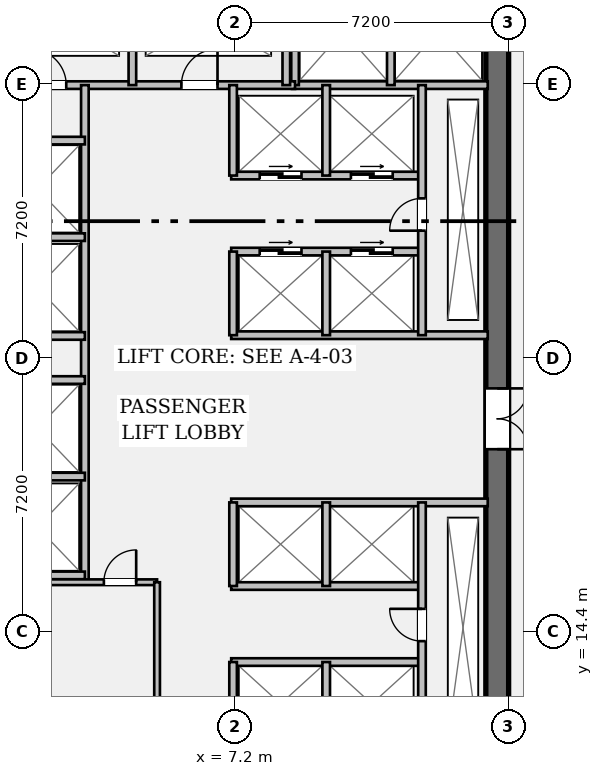
"""IFC4 building model, lengths in metres.
Left out: names, types, materials, properties, quantities, classifications, styles, units other than length and angle.
Written with IfcOpenShell. Run it as: python <this file> out.ifc"""

import sys

from ifc_helpers import new_model, si_unit, direction, frame, frame_2d, origin, place, context, subcontext, project, spatial, rectangle, extrude, element, fill, save


model = new_model("IFC4")
c1 = context("Model", 3, precision=1e-05, world=origin(), true_north=direction((0.0, 1.0)))
c2 = subcontext(c1, "Body", "Model", "MODEL_VIEW")
j1 = project(units=[si_unit("LENGTHUNIT", "METRE"), si_unit("PLANEANGLEUNIT", "RADIAN")], contexts=[c1])
p1 = place(None, origin())
s1 = spatial("IfcSite", under=j1, at=p1, CompositionType="ELEMENT")
p2 = place(p1, origin())
s2 = spatial("IfcBuilding", under=s1, at=p2, CompositionType="ELEMENT")
p3 = place(p2, frame((0.0, 0.0, 26.25)))
s3 = spatial("IfcBuildingStorey", under=s2, at=p3, CompositionType="ELEMENT", Elevation=26.25)
p4 = place(p3, frame((14.1, 35.4, 0.0), z_axis=(0.0, 0.0, 1.0), x_axis=(0.0, -1.0, 0.0)))
e1 = element("IfcWall", 1, at=p4, inside=s3, PredefinedType="SHEAR", context=c2, shape_type="SweptSolid", body=[
    extrude(rectangle(XDim=27.6, YDim=0.6, at=frame_2d((13.8, 0.0))), origin(), (0.0, 0.0, 1.0), 4.62),
])
p5 = place(p4, frame((1.3, 0.0, 0.0)))
e2 = element("IfcOpeningElement", 2, at=p5, cuts=e1, PredefinedType="OPENING", context=c2, shape_type="SweptSolid", body=[
    extrude(rectangle(XDim=1.2, YDim=2.15, at=frame_2d((0.6, 1.075))), frame((0.0, 0.312, 0.0), z_axis=(0.0, -1.0, 0.0), x_axis=(1.0, 0.0, 0.0)), (0.0, 0.0, 1.0), 0.624),
])
p6 = place(p4, frame((25.25, 0.0, 0.0)))
e3 = element("IfcOpeningElement", 3, at=p6, cuts=e1, PredefinedType="OPENING", context=c2, shape_type="SweptSolid", body=[
    extrude(rectangle(XDim=1.2, YDim=2.15, at=frame_2d((0.6, 1.075))), frame((0.0, 0.312, 0.0), z_axis=(0.0, -1.0, 0.0), x_axis=(1.0, 0.0, 0.0)), (0.0, 0.0, 1.0), 0.624),
])
p7 = place(p4, frame((14.6, 0.0, 0.0)))
e4 = element("IfcOpeningElement", 4, at=p7, cuts=e1, PredefinedType="OPENING", context=c2, shape_type="SweptSolid", body=[
    extrude(rectangle(XDim=1.6, YDim=2.2, at=frame_2d((0.8, 1.1))), frame((0.0, 0.312, 0.0), z_axis=(0.0, -1.0, 0.0), x_axis=(1.0, 0.0, 0.0)), (0.0, 0.0, 1.0), 0.624),
])
p8 = place(p3, frame((8.7, 28.78, 0.0), z_axis=(0.0, 0.0, 1.0), x_axis=(1.0, 0.0, 0.0)))
e5 = element("IfcWall", 5, at=p8, inside=s3, PredefinedType="PARTITIONING", context=c2, shape_type="SweptSolid", body=[
    extrude(rectangle(XDim=5.15, YDim=0.2, at=frame_2d((2.575, 0.0))), origin(), (0.0, 0.0, 1.0), 4.62),
])
for number, where, z_axis, x_axis in (
    (6, (8.78, 28.78, 0.0), (0.0, 0.0, 1.0), (0.0, 1.0, 0.0)),
    (7, (11.3, 28.78, 0.0), (0.0, 0.0, 1.0), (0.0, 1.0, 0.0)),
):
    element("IfcWall", number, at=place(p3, frame(where, z_axis=z_axis, x_axis=x_axis)), inside=s3, PredefinedType="PARTITIONING", context=c2, shape_type="SweptSolid", body=[
        extrude(rectangle(XDim=3.1, YDim=0.2, at=frame_2d((1.55, 0.0))), origin(), (0.0, 0.0, 1.0), 4.62),
    ])
p9 = place(p3, frame((0.6, 28.78, 0.0), z_axis=(0.0, 0.0, 1.0), x_axis=(1.0, 0.0, 0.0)))
e8 = element("IfcWall", 8, at=p9, inside=s3, PredefinedType="PARTITIONING", context=c2, shape_type="SweptSolid", body=[
    extrude(rectangle(XDim=8.18, YDim=0.2, at=frame_2d((4.09, 0.0))), origin(), (0.0, 0.0, 1.0), 4.62),
])
p10 = place(p9, frame((1.21, 0.0, 0.0)))
e9 = element("IfcOpeningElement", 9, at=p10, cuts=e8, PredefinedType="OPENING", context=c2, shape_type="SweptSolid", body=[
    extrude(rectangle(XDim=0.95, YDim=2.15, at=frame_2d((0.475, 1.075))), frame((0.0, 0.112, 0.0), z_axis=(0.0, -1.0, 0.0), x_axis=(1.0, 0.0, 0.0)), (0.0, 0.0, 1.0), 0.224),
])
p11 = place(p9, frame((5.19, 0.0, 0.0)))
e10 = element("IfcOpeningElement", 10, at=p11, cuts=e8, PredefinedType="OPENING", context=c2, shape_type="SweptSolid", body=[
    extrude(rectangle(XDim=0.95, YDim=2.15, at=frame_2d((0.475, 1.075))), frame((0.0, 0.112, 0.0), z_axis=(0.0, -1.0, 0.0), x_axis=(1.0, 0.0, 0.0)), (0.0, 0.0, 1.0), 0.224),
])
for number, where, z_axis, x_axis in (
    (11, (4.5, 28.78, 0.0), (0.0, 0.0, 1.0), (0.0, 1.0, 0.0)),
    (12, (8.55, 28.78, 0.0), (0.0, 0.0, 1.0), (0.0, 1.0, 0.0)),
):
    element("IfcWall", number, at=place(p3, frame(where, z_axis=z_axis, x_axis=x_axis)), inside=s3, PredefinedType="PARTITIONING", context=c2, shape_type="SweptSolid", body=[
        extrude(rectangle(XDim=2.94, YDim=0.2, at=frame_2d((1.47, 0.0))), origin(), (0.0, 0.0, 1.0), 4.62),
    ])
p12 = place(p3, frame((3.25, 15.7, 0.0), z_axis=(0.0, 0.0, 1.0), x_axis=(0.0, 1.0, 0.0)))
e13 = element("IfcWall", 13, at=p12, inside=s3, PredefinedType="PARTITIONING", context=c2, shape_type="SweptSolid", body=[
    extrude(rectangle(XDim=13.08, YDim=0.2, at=frame_2d((6.54, 0.0))), origin(), (0.0, 0.0, 1.0), 4.62),
])
for number, where, z_axis, x_axis in (
    (14, (0.6, 15.88, 0.0), (0.0, 0.0, 1.0), (1.0, 0.0, 0.0)),
    (15, (0.6, 18.48, 0.0), (0.0, 0.0, 1.0), (1.0, 0.0, 0.0)),
    (16, (0.6, 22.18, 0.0), (0.0, 0.0, 1.0), (1.0, 0.0, 0.0)),
    (17, (0.6, 24.78, 0.0), (0.0, 0.0, 1.0), (1.0, 0.0, 0.0)),
    (18, (0.6, 21.02, 0.0), (0.0, 0.0, 1.0), (1.0, 0.0, 0.0)),
    (19, (0.6, 27.32, 0.0), (0.0, 0.0, 1.0), (1.0, 0.0, 0.0)),
):
    element("IfcWall", number, at=place(p3, frame(where, z_axis=z_axis, x_axis=x_axis)), inside=s3, PredefinedType="PARTITIONING", context=c2, shape_type="SweptSolid", body=[
        extrude(rectangle(XDim=2.65, YDim=0.2, at=frame_2d((1.325, 0.0))), origin(), (0.0, 0.0, 1.0), 4.62),
    ])
p13 = place(p3, frame((7.1, 22.2, 0.0), z_axis=(0.0, 0.0, 1.0), x_axis=(1.0, 0.0, 0.0)))
e20 = element("IfcWall", 20, at=p13, inside=s3, PredefinedType="PARTITIONING", context=c2, shape_type="SweptSolid", body=[
    extrude(rectangle(XDim=6.75, YDim=0.2, at=frame_2d((3.375, 0.0))), origin(), (0.0, 0.0, 1.0), 4.62),
])
p14 = place(p3, frame((7.1, 24.4, 0.0), z_axis=(0.0, 0.0, 1.0), x_axis=(1.0, 0.0, 0.0)))
e21 = element("IfcWall", 21, at=p14, inside=s3, PredefinedType="PARTITIONING", context=c2, shape_type="SweptSolid", body=[
    extrude(rectangle(XDim=5.02, YDim=0.2, at=frame_2d((2.51, 0.0))), origin(), (0.0, 0.0, 1.0), 4.62),
])
p15 = place(p14, frame((0.75, 0.0, 0.0)))
e22 = element("IfcOpeningElement", 22, at=p15, cuts=e21, PredefinedType="OPENING", context=c2, shape_type="SweptSolid", body=[
    extrude(rectangle(XDim=1.1, YDim=2.2, at=frame_2d((0.55, 1.1))), frame((0.0, 0.112, 0.0), z_axis=(0.0, -1.0, 0.0), x_axis=(1.0, 0.0, 0.0)), (0.0, 0.0, 1.0), 0.224),
])
p16 = place(p14, frame((3.15, 0.0, 0.0)))
e23 = element("IfcOpeningElement", 23, at=p16, cuts=e21, PredefinedType="OPENING", context=c2, shape_type="SweptSolid", body=[
    extrude(rectangle(XDim=1.1, YDim=2.2, at=frame_2d((0.55, 1.1))), frame((0.0, 0.112, 0.0), z_axis=(0.0, -1.0, 0.0), x_axis=(1.0, 0.0, 0.0)), (0.0, 0.0, 1.0), 0.224),
])
p17 = place(p3, frame((7.1, 26.4, 0.0), z_axis=(0.0, 0.0, 1.0), x_axis=(1.0, 0.0, 0.0)))
e24 = element("IfcWall", 24, at=p17, inside=s3, PredefinedType="PARTITIONING", context=c2, shape_type="SweptSolid", body=[
    extrude(rectangle(XDim=5.02, YDim=0.2, at=frame_2d((2.51, 0.0))), origin(), (0.0, 0.0, 1.0), 4.62),
])
p18 = place(p17, frame((0.75, 0.0, 0.0)))
e25 = element("IfcOpeningElement", 25, at=p18, cuts=e24, PredefinedType="OPENING", context=c2, shape_type="SweptSolid", body=[
    extrude(rectangle(XDim=1.1, YDim=2.2, at=frame_2d((0.55, 1.1))), frame((0.0, 0.112, 0.0), z_axis=(0.0, -1.0, 0.0), x_axis=(1.0, 0.0, 0.0)), (0.0, 0.0, 1.0), 0.224),
])
p19 = place(p17, frame((3.15, 0.0, 0.0)))
e26 = element("IfcOpeningElement", 26, at=p19, cuts=e24, PredefinedType="OPENING", context=c2, shape_type="SweptSolid", body=[
    extrude(rectangle(XDim=1.1, YDim=2.2, at=frame_2d((0.55, 1.1))), frame((0.0, 0.112, 0.0), z_axis=(0.0, -1.0, 0.0), x_axis=(1.0, 0.0, 0.0)), (0.0, 0.0, 1.0), 0.224),
])
p20 = place(p3, frame((7.15, 22.2, 0.0), z_axis=(0.0, 0.0, 1.0), x_axis=(0.0, 1.0, 0.0)))
e27 = element("IfcWall", 27, at=p20, inside=s3, PredefinedType="PARTITIONING", context=c2, shape_type="SweptSolid", body=[
    extrude(rectangle(XDim=2.2, YDim=0.2, at=frame_2d((1.1, 0.0))), origin(), (0.0, 0.0, 1.0), 4.62),
])
p21 = place(p3, frame((7.15, 26.4, 0.0), z_axis=(0.0, 0.0, 1.0), x_axis=(0.0, 1.0, 0.0)))
e28 = element("IfcWall", 28, at=p21, inside=s3, PredefinedType="PARTITIONING", context=c2, shape_type="SweptSolid", body=[
    extrude(rectangle(XDim=2.38, YDim=0.2, at=frame_2d((1.19, 0.0))), origin(), (0.0, 0.0, 1.0), 4.62),
])
p22 = place(p3, frame((9.6, 22.2, 0.0), z_axis=(0.0, 0.0, 1.0), x_axis=(0.0, 1.0, 0.0)))
e29 = element("IfcWall", 29, at=p22, inside=s3, PredefinedType="PARTITIONING", context=c2, shape_type="SweptSolid", body=[
    extrude(rectangle(XDim=2.2, YDim=0.2, at=frame_2d((1.1, 0.0))), origin(), (0.0, 0.0, 1.0), 4.62),
])
p23 = place(p3, frame((9.6, 26.4, 0.0), z_axis=(0.0, 0.0, 1.0), x_axis=(0.0, 1.0, 0.0)))
e30 = element("IfcWall", 30, at=p23, inside=s3, PredefinedType="PARTITIONING", context=c2, shape_type="SweptSolid", body=[
    extrude(rectangle(XDim=2.38, YDim=0.2, at=frame_2d((1.19, 0.0))), origin(), (0.0, 0.0, 1.0), 4.62),
])
p24 = place(p3, frame((12.12, 22.2, 0.0), z_axis=(0.0, 0.0, 1.0), x_axis=(0.0, 1.0, 0.0)))
e31 = element("IfcWall", 31, at=p24, inside=s3, PredefinedType="PARTITIONING", context=c2, shape_type="SweptSolid", body=[
    extrude(rectangle(XDim=6.58, YDim=0.2, at=frame_2d((3.29, 0.0))), origin(), (0.0, 0.0, 1.0), 4.62),
])
p25 = place(p24, frame((2.75, 0.0, 0.0)))
e32 = element("IfcOpeningElement", 32, at=p25, cuts=e31, PredefinedType="OPENING", context=c2, shape_type="SweptSolid", body=[
    extrude(rectangle(XDim=0.85, YDim=2.15, at=frame_2d((0.425, 1.075))), frame((0.0, 0.112, 0.0), z_axis=(0.0, -1.0, 0.0), x_axis=(1.0, 0.0, 0.0)), (0.0, 0.0, 1.0), 0.224),
])
p26 = place(p3, frame((7.1, 17.8, 0.0), z_axis=(0.0, 0.0, 1.0), x_axis=(1.0, 0.0, 0.0)))
e33 = element("IfcWall", 33, at=p26, inside=s3, PredefinedType="PARTITIONING", context=c2, shape_type="SweptSolid", body=[
    extrude(rectangle(XDim=6.75, YDim=0.2, at=frame_2d((3.375, 0.0))), origin(), (0.0, 0.0, 1.0), 4.62),
])
for number, where, z_axis, x_axis in (
    (34, (7.1, 15.6, 0.0), (0.0, 0.0, 1.0), (1.0, 0.0, 0.0)),
    (35, (7.1, 13.6, 0.0), (0.0, 0.0, 1.0), (1.0, 0.0, 0.0)),
):
    element("IfcWall", number, at=place(p3, frame(where, z_axis=z_axis, x_axis=x_axis)), inside=s3, PredefinedType="PARTITIONING", context=c2, shape_type="SweptSolid", body=[
        extrude(rectangle(XDim=5.02, YDim=0.2, at=frame_2d((2.51, 0.0))), origin(), (0.0, 0.0, 1.0), 4.62),
    ])
p27 = place(p3, frame((7.15, 15.6, 0.0), z_axis=(0.0, 0.0, 1.0), x_axis=(0.0, 1.0, 0.0)))
e36 = element("IfcWall", 36, at=p27, inside=s3, PredefinedType="PARTITIONING", context=c2, shape_type="SweptSolid", body=[
    extrude(rectangle(XDim=2.2, YDim=0.2, at=frame_2d((1.1, 0.0))), origin(), (0.0, 0.0, 1.0), 4.62),
])
p28 = place(p3, frame((7.15, 11.2, 0.0), z_axis=(0.0, 0.0, 1.0), x_axis=(0.0, 1.0, 0.0)))
e37 = element("IfcWall", 37, at=p28, inside=s3, PredefinedType="PARTITIONING", context=c2, shape_type="SweptSolid", body=[
    extrude(rectangle(XDim=2.4, YDim=0.2, at=frame_2d((1.2, 0.0))), origin(), (0.0, 0.0, 1.0), 4.62),
])
p29 = place(p3, frame((9.6, 15.6, 0.0), z_axis=(0.0, 0.0, 1.0), x_axis=(0.0, 1.0, 0.0)))
e38 = element("IfcWall", 38, at=p29, inside=s3, PredefinedType="PARTITIONING", context=c2, shape_type="SweptSolid", body=[
    extrude(rectangle(XDim=2.2, YDim=0.2, at=frame_2d((1.1, 0.0))), origin(), (0.0, 0.0, 1.0), 4.62),
])
p30 = place(p3, frame((9.6, 11.2, 0.0), z_axis=(0.0, 0.0, 1.0), x_axis=(0.0, 1.0, 0.0)))
e39 = element("IfcWall", 39, at=p30, inside=s3, PredefinedType="PARTITIONING", context=c2, shape_type="SweptSolid", body=[
    extrude(rectangle(XDim=2.4, YDim=0.2, at=frame_2d((1.2, 0.0))), origin(), (0.0, 0.0, 1.0), 4.62),
])
p31 = place(p3, frame((12.12, 11.2, 0.0), z_axis=(0.0, 0.0, 1.0), x_axis=(0.0, 1.0, 0.0)))
e40 = element("IfcWall", 40, at=p31, inside=s3, PredefinedType="PARTITIONING", context=c2, shape_type="SweptSolid", body=[
    extrude(rectangle(XDim=6.6, YDim=0.2, at=frame_2d((3.3, 0.0))), origin(), (0.0, 0.0, 1.0), 4.62),
])
p32 = place(p31, frame((2.95, 0.0, 0.0)))
e41 = element("IfcOpeningElement", 41, at=p32, cuts=e40, PredefinedType="OPENING", context=c2, shape_type="SweptSolid", body=[
    extrude(rectangle(XDim=0.85, YDim=2.15, at=frame_2d((0.425, 1.075))), frame((0.0, 0.112, 0.0), z_axis=(0.0, -1.0, 0.0), x_axis=(1.0, 0.0, 0.0)), (0.0, 0.0, 1.0), 0.224),
])
p33 = place(p3, frame((0.6, 15.7, 0.0), z_axis=(0.0, 0.0, 1.0), x_axis=(1.0, 0.0, 0.0)))
e42 = element("IfcWall", 42, at=p33, inside=s3, PredefinedType="PARTITIONING", context=c2, shape_type="SweptSolid", body=[
    extrude(rectangle(XDim=4.55, YDim=0.15, at=frame_2d((2.275, 0.0))), origin(), (0.0, 0.0, 1.0), 4.62),
])
p34 = place(p33, frame((3.15, 0.0, 0.0)))
e43 = element("IfcOpeningElement", 43, at=p34, cuts=e42, PredefinedType="OPENING", context=c2, shape_type="SweptSolid", body=[
    extrude(rectangle(XDim=0.85, YDim=2.15, at=frame_2d((0.425, 1.075))), frame((0.0, 0.087, 0.0), z_axis=(0.0, -1.0, 0.0), x_axis=(1.0, 0.0, 0.0)), (0.0, 0.0, 1.0), 0.174),
])
p35 = place(p3, frame((5.15, 11.28, 0.0), z_axis=(0.0, 0.0, 1.0), x_axis=(0.0, 1.0, 0.0)))
e44 = element("IfcWall", 44, at=p35, inside=s3, PredefinedType="PARTITIONING", context=c2, shape_type="SweptSolid", body=[
    extrude(rectangle(XDim=4.42, YDim=0.15, at=frame_2d((2.21, 0.0))), origin(), (0.0, 0.0, 1.0), 4.62),
])
p36 = place(p10, origin())
e45 = element("IfcDoor", 45, at=p36, inside=s3, OperationType="SINGLE_SWING_LEFT", PredefinedType="DOOR", context=c2, shape_type="SweptSolid", body=[
    extrude(rectangle(XDim=0.95, YDim=2.15, at=frame_2d((0.475, 1.075))), frame((0.0, 0.025, 0.0), z_axis=(0.0, -1.0, 0.0), x_axis=(1.0, 0.0, 0.0)), (0.0, 0.0, 1.0), 0.05),
])
fill(e9, e45)
p37 = place(p11, origin())
e46 = element("IfcDoor", 46, at=p37, inside=s3, OperationType="SINGLE_SWING_RIGHT", PredefinedType="DOOR", context=c2, shape_type="SweptSolid", body=[
    extrude(rectangle(XDim=0.95, YDim=2.15, at=frame_2d((0.475, 1.075))), frame((0.0, 0.025, 0.0), z_axis=(0.0, -1.0, 0.0), x_axis=(1.0, 0.0, 0.0)), (0.0, 0.0, 1.0), 0.05),
])
fill(e10, e46)
p38 = place(p7, origin())
e47 = element("IfcDoor", 47, at=p38, inside=s3, OperationType="DOUBLE_DOOR_SINGLE_SWING", PredefinedType="DOOR", context=c2, shape_type="SweptSolid", body=[
    extrude(rectangle(XDim=1.6, YDim=2.2, at=frame_2d((0.8, 1.1))), frame((0.0, 0.025, 0.0), z_axis=(0.0, -1.0, 0.0), x_axis=(1.0, 0.0, 0.0)), (0.0, 0.0, 1.0), 0.05),
])
fill(e4, e47)
p39 = place(p25, origin())
e48 = element("IfcDoor", 48, at=p39, inside=s3, OperationType="SINGLE_SWING_LEFT", PredefinedType="DOOR", context=c2, shape_type="SweptSolid", body=[
    extrude(rectangle(XDim=0.85, YDim=2.15, at=frame_2d((0.425, 1.075))), frame((0.0, 0.025, 0.0), z_axis=(0.0, -1.0, 0.0), x_axis=(1.0, 0.0, 0.0)), (0.0, 0.0, 1.0), 0.05),
])
fill(e32, e48)
p40 = place(p15, origin())
e49 = element("IfcDoor", 49, at=p40, inside=s3, OperationType="DOUBLE_DOOR_SLIDING", PredefinedType="DOOR", context=c2, shape_type="SweptSolid", body=[
    extrude(rectangle(XDim=1.1, YDim=2.2, at=frame_2d((0.55, 1.1))), frame((0.0, 0.025, 0.0), z_axis=(0.0, -1.0, 0.0), x_axis=(1.0, 0.0, 0.0)), (0.0, 0.0, 1.0), 0.05),
])
fill(e22, e49)
p41 = place(p16, origin())
e50 = element("IfcDoor", 50, at=p41, inside=s3, OperationType="DOUBLE_DOOR_SLIDING", PredefinedType="DOOR", context=c2, shape_type="SweptSolid", body=[
    extrude(rectangle(XDim=1.1, YDim=2.2, at=frame_2d((0.55, 1.1))), frame((0.0, 0.025, 0.0), z_axis=(0.0, -1.0, 0.0), x_axis=(1.0, 0.0, 0.0)), (0.0, 0.0, 1.0), 0.05),
])
fill(e23, e50)
p42 = place(p18, origin())
e51 = element("IfcDoor", 51, at=p42, inside=s3, OperationType="DOUBLE_DOOR_SLIDING", PredefinedType="DOOR", context=c2, shape_type="SweptSolid", body=[
    extrude(rectangle(XDim=1.1, YDim=2.2, at=frame_2d((0.55, 1.1))), frame((0.0, 0.025, 0.0), z_axis=(0.0, -1.0, 0.0), x_axis=(1.0, 0.0, 0.0)), (0.0, 0.0, 1.0), 0.05),
])
fill(e25, e51)
p43 = place(p19, origin())
e52 = element("IfcDoor", 52, at=p43, inside=s3, OperationType="DOUBLE_DOOR_SLIDING", PredefinedType="DOOR", context=c2, shape_type="SweptSolid", body=[
    extrude(rectangle(XDim=1.1, YDim=2.2, at=frame_2d((0.55, 1.1))), frame((0.0, 0.025, 0.0), z_axis=(0.0, -1.0, 0.0), x_axis=(1.0, 0.0, 0.0)), (0.0, 0.0, 1.0), 0.05),
])
fill(e26, e52)
p44 = place(p32, origin())
e53 = element("IfcDoor", 53, at=p44, inside=s3, OperationType="SINGLE_SWING_RIGHT", PredefinedType="DOOR", context=c2, shape_type="SweptSolid", body=[
    extrude(rectangle(XDim=0.85, YDim=2.15, at=frame_2d((0.425, 1.075))), frame((0.0, 0.025, 0.0), z_axis=(0.0, -1.0, 0.0), x_axis=(1.0, 0.0, 0.0)), (0.0, 0.0, 1.0), 0.05),
])
fill(e41, e53)
p45 = place(p34, origin())
e54 = element("IfcDoor", 54, at=p45, inside=s3, OperationType="SINGLE_SWING_RIGHT", PredefinedType="DOOR", context=c2, shape_type="SweptSolid", body=[
    extrude(rectangle(XDim=0.85, YDim=2.15, at=frame_2d((0.425, 1.075))), frame((0.0, 0.025, 0.0), z_axis=(0.0, -1.0, 0.0), x_axis=(1.0, 0.0, 0.0)), (0.0, 0.0, 1.0), 0.05),
])
fill(e43, e54)
save(model, sys.argv[1])
